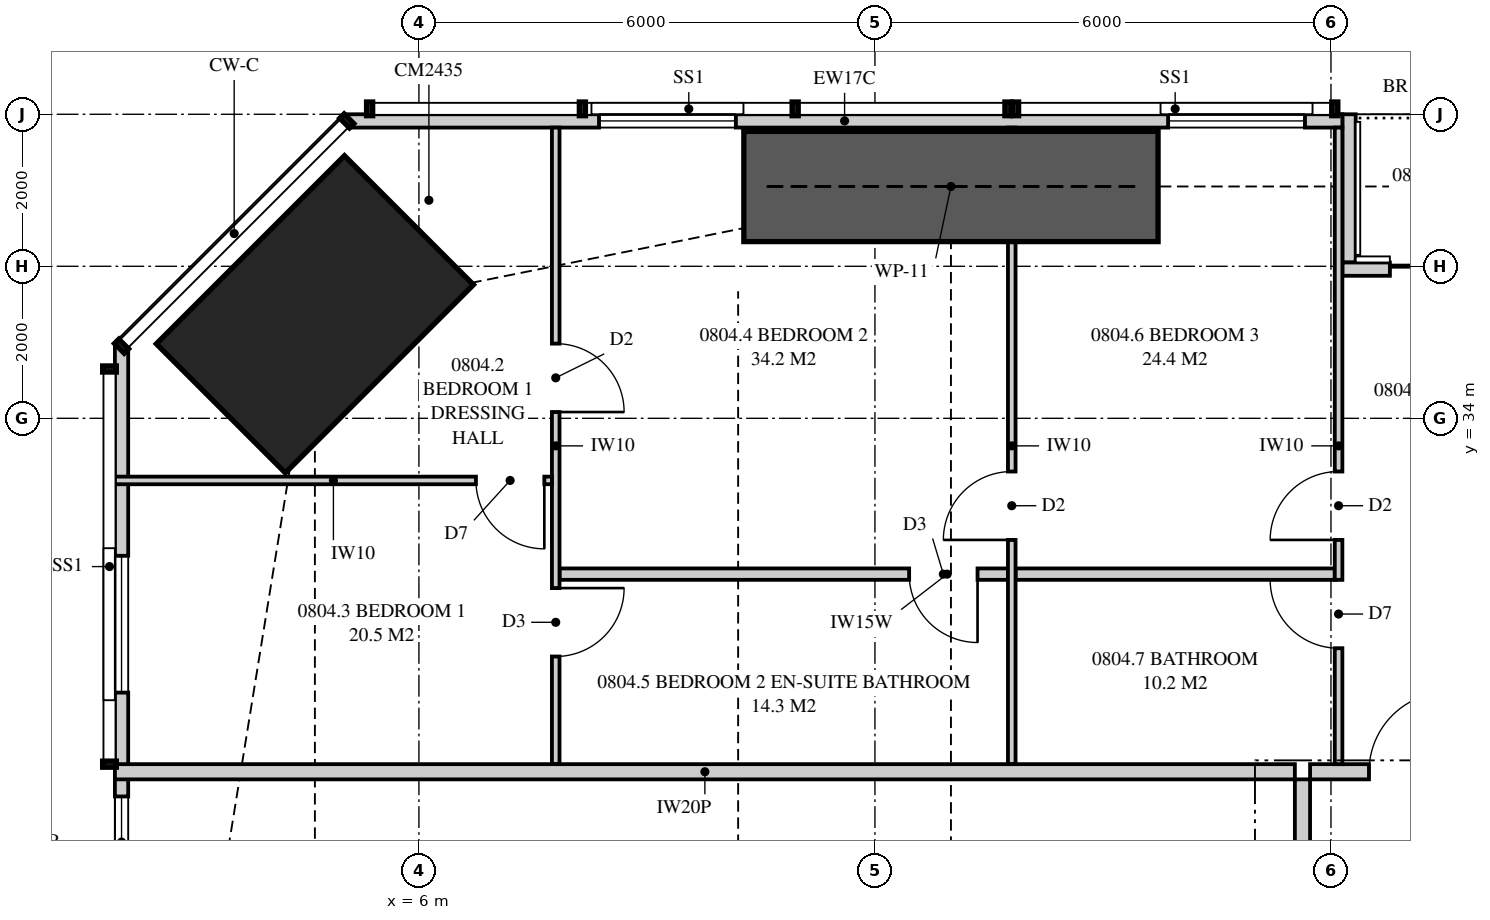
"""IFC4 building model, lengths in metres.
Left out: names, types, materials, properties, quantities, classifications, styles, units other than length and angle.
Written with IfcOpenShell. Run it as: python <this file> out.ifc"""

import sys

from ifc_helpers import new_model, si_unit, direction, frame, frame_2d, origin, origin_2d, place, context, subcontext, project, spatial, polyline, rectangle, outline, extrude, element, fill, save


model = new_model("IFC4")
c1 = context("Model", 3, precision=1e-05, world=origin(), true_north=direction((0.0, 1.0)))
c2 = subcontext(c1, "Body", "Model", "MODEL_VIEW")
j1 = project(units=[si_unit("LENGTHUNIT", "METRE"), si_unit("PLANEANGLEUNIT", "RADIAN")], contexts=[c1])
p1 = place(None, origin())
s1 = spatial("IfcSite", under=j1, at=p1, CompositionType="ELEMENT")
p2 = place(p1, origin())
s2 = spatial("IfcBuilding", under=s1, at=p2, CompositionType="ELEMENT")
p3 = place(p2, frame((0.0, 0.0, 34.4)))
s3 = spatial("IfcBuildingStorey", under=s2, at=p3, CompositionType="ELEMENT", Elevation=34.4)
p4 = place(p3, frame((4.631, 35.369, 0.0), z_axis=(0.0, 0.0, 1.0), x_axis=(0.707106781187, -0.707106781187, 0.0)))
e1 = element("IfcColumn", 1, at=p4, inside=s3, PredefinedType="COLUMN", context=c2, shape_type="SweptSolid", body=[
    extrude(rectangle(XDim=2.4, YDim=3.5, at=origin_2d()), origin(), (0.0, 0.0, 1.0), 3.35),
])
p5 = place(p3, frame((18.15, 37.913, 0.0), z_axis=(0.0, 0.0, 1.0), x_axis=(-1.0, 0.0, 0.0)))
e2 = element("IfcWall", 2, at=p5, inside=s3, PredefinedType="SOLIDWALL", context=c2, shape_type="SweptSolid", body=[
    extrude(outline(polyline([(0.0, 0.0), (13.099, 0.0), (13.099, 3.11), (5.354, 3.11), (5.354, 2.15), (5.306, 2.15), (5.306, 3.11), (5.15, 3.11), (5.15, 2.15), (0.0, 2.15), (0.0, 0.0)])), frame((0.0, 0.087, 0.0), z_axis=(0.0, -1.0, 0.0), x_axis=(1.0, 0.0, 0.0)), (0.0, 0.0, 1.0), 0.175),
])
p6 = place(p5, frame((0.492, 0.0, 0.4)))
e3 = element("IfcOpeningElement", 3, at=p6, cuts=e2, PredefinedType="OPENING", context=c2, shape_type="SweptSolid", body=[
    extrude(rectangle(XDim=1.8, YDim=1.7, at=frame_2d((0.9, 0.85))), frame((0.0, 0.097, 0.0), z_axis=(0.0, -1.0, 0.0), x_axis=(1.0, 0.0, 0.0)), (0.0, 0.0, 1.0), 0.195),
])
p7 = place(p5, frame((7.98, 0.0, 0.4)))
e4 = element("IfcOpeningElement", 4, at=p7, cuts=e2, PredefinedType="OPENING", context=c2, shape_type="SweptSolid", body=[
    extrude(rectangle(XDim=1.8, YDim=1.7, at=frame_2d((0.9, 0.85))), frame((0.0, 0.097, 0.0), z_axis=(0.0, -1.0, 0.0), x_axis=(1.0, 0.0, 0.0)), (0.0, 0.0, 1.0), 0.195),
])
p8 = place(p3, frame((21.2, 35.962, 0.0), z_axis=(0.0, 0.0, 1.0), x_axis=(-1.0, 0.0, 0.0)))
e5 = element("IfcWall", 5, at=p8, inside=s3, PredefinedType="SOLIDWALL", context=c2, shape_type="SweptSolid", body=[
    extrude(rectangle(XDim=3.05, YDim=0.175, at=frame_2d((1.525, 0.0))), origin(), (0.0, 0.0, 1.0), 3.11),
])
p9 = place(p8, frame((0.625, 0.0, 0.0)))
e6 = element("IfcOpeningElement", 6, at=p9, cuts=e5, PredefinedType="OPENING", context=c2, shape_type="SweptSolid", body=[
    extrude(rectangle(XDim=1.8, YDim=2.1, at=frame_2d((0.9, 1.05))), frame((0.0, 0.097, 0.0), z_axis=(0.0, -1.0, 0.0), x_axis=(1.0, 0.0, 0.0)), (0.0, 0.0, 1.0), 0.195),
])
p10 = place(p3, frame((18.238, 38.0, 0.0), z_axis=(0.0, 0.0, 1.0), x_axis=(0.0, -1.0, 0.0)))
e7 = element("IfcWall", 7, at=p10, inside=s3, PredefinedType="SOLIDWALL", context=c2, shape_type="SweptSolid", body=[
    extrude(outline(polyline([(0.0, 0.0), (1.95, 0.0), (1.95, 3.11), (1.75, 3.11), (1.75, 2.15), (0.15, 2.15), (0.15, 3.11), (0.0, 3.11), (0.0, 0.0)])), frame((0.0, 0.087, 0.0), z_axis=(0.0, -1.0, 0.0), x_axis=(1.0, 0.0, 0.0)), (0.0, 0.0, 1.0), 0.175),
])
p11 = place(p3, frame((2.087, 34.949, 0.0), z_axis=(0.0, 0.0, 1.0), x_axis=(0.0, -1.0, 0.0)))
e8 = element("IfcWall", 8, at=p11, inside=s3, PredefinedType="SOLIDWALL", context=c2, shape_type="SweptSolid", body=[
    extrude(outline(polyline([(0.0, 0.0), (16.099, 0.0), (16.099, 2.15), (9.949, 2.15), (9.949, 3.11), (9.823, 3.11), (9.823, 2.15), (9.73, 2.15), (9.73, 3.11), (0.0, 3.11), (0.0, 0.0)])), frame((0.0, 0.087, 0.0), z_axis=(0.0, -1.0, 0.0), x_axis=(1.0, 0.0, 0.0)), (0.0, 0.0, 1.0), 0.175),
])
p12 = place(p11, frame((2.757, 0.0, 0.4)))
e9 = element("IfcOpeningElement", 9, at=p12, cuts=e8, PredefinedType="OPENING", context=c2, shape_type="SweptSolid", body=[
    extrude(rectangle(XDim=1.8, YDim=1.7, at=frame_2d((0.9, 0.85))), frame((0.0, 0.097, 0.0), z_axis=(0.0, -1.0, 0.0), x_axis=(1.0, 0.0, 0.0)), (0.0, 0.0, 1.0), 0.195),
])
p13 = place(p11, frame((5.924, 0.0, 0.4)))
e10 = element("IfcOpeningElement", 10, at=p13, cuts=e8, PredefinedType="OPENING", context=c2, shape_type="SweptSolid", body=[
    extrude(rectangle(XDim=1.2, YDim=1.7, at=frame_2d((0.6, 0.85))), frame((0.0, 0.097, 0.0), z_axis=(0.0, -1.0, 0.0), x_axis=(1.0, 0.0, 0.0)), (0.0, 0.0, 1.0), 0.195),
])
p14 = place(p11, frame((12.799, 0.0, 0.4)))
e11 = element("IfcOpeningElement", 11, at=p14, cuts=e8, PredefinedType="OPENING", context=c2, shape_type="SweptSolid", body=[
    extrude(rectangle(XDim=1.8, YDim=1.7, at=frame_2d((0.9, 0.85))), frame((0.0, 0.097, 0.0), z_axis=(0.0, -1.0, 0.0), x_axis=(1.0, 0.0, 0.0)), (0.0, 0.0, 1.0), 0.195),
])
p15 = place(p3, frame((17.725, 29.35, 0.0), z_axis=(0.0, 0.0, 1.0), x_axis=(1.0, 0.0, 0.0)))
e12 = element("IfcWall", 12, at=p15, inside=s3, PredefinedType="PARTITIONING", context=c2, shape_type="SweptSolid", body=[
    extrude(rectangle(XDim=5.375, YDim=0.2, at=frame_2d((2.688, 0.0))), origin(), (0.0, 0.0, 1.0), 3.11),
])
p16 = place(p15, frame((0.775, 0.0, 0.0)))
e13 = element("IfcOpeningElement", 13, at=p16, cuts=e12, PredefinedType="OPENING", context=c2, shape_type="SweptSolid", body=[
    extrude(rectangle(XDim=1.05, YDim=2.2, at=frame_2d((0.525, 1.1))), frame((0.0, 0.11, 0.0), z_axis=(0.0, -1.0, 0.0), x_axis=(1.0, 0.0, 0.0)), (0.0, 0.0, 1.0), 0.22),
])
p17 = place(p3, frame((7.8, 37.825, 0.0), z_axis=(0.0, 0.0, 1.0), x_axis=(0.0, -1.0, 0.0)))
e14 = element("IfcWall", 14, at=p17, inside=s3, PredefinedType="PARTITIONING", context=c2, shape_type="SweptSolid", body=[
    extrude(outline(polyline([(0.0, 0.0), (8.375, 0.0), (8.375, 3.11), (2.697, 3.11), (2.697, 2.15), (0.943, 2.15), (0.943, 3.11), (0.0, 3.11), (0.0, 0.0)])), frame((0.0, 0.05, 0.0), z_axis=(0.0, -1.0, 0.0), x_axis=(1.0, 0.0, 0.0)), (0.0, 0.0, 1.0), 0.1),
])
p18 = place(p17, frame((2.842, 0.0, 0.0)))
e15 = element("IfcOpeningElement", 15, at=p18, cuts=e14, PredefinedType="OPENING", context=c2, shape_type="SweptSolid", body=[
    extrude(rectangle(XDim=0.9, YDim=2.1, at=frame_2d((0.45, 1.05))), frame((0.0, 0.06, 0.0), z_axis=(0.0, -1.0, 0.0), x_axis=(1.0, 0.0, 0.0)), (0.0, 0.0, 1.0), 0.12),
])
p19 = place(p17, frame((6.059, 0.0, 0.0)))
e16 = element("IfcOpeningElement", 16, at=p19, cuts=e14, PredefinedType="OPENING", context=c2, shape_type="SweptSolid", body=[
    extrude(rectangle(XDim=0.9, YDim=2.1, at=frame_2d((0.45, 1.05))), frame((0.0, 0.06, 0.0), z_axis=(0.0, -1.0, 0.0), x_axis=(1.0, 0.0, 0.0)), (0.0, 0.0, 1.0), 0.12),
])
p20 = place(p3, frame((13.8, 37.825, 0.0), z_axis=(0.0, 0.0, 1.0), x_axis=(0.0, -1.0, 0.0)))
e17 = element("IfcWall", 17, at=p20, inside=s3, PredefinedType="PARTITIONING", context=c2, shape_type="SweptSolid", body=[
    extrude(outline(polyline([(1.635, 2.15), (0.0, 2.15), (0.0, 0.0), (8.375, 0.0), (8.375, 3.11), (1.635, 3.11), (1.635, 2.15)]), holes=[polyline([(1.021, 0.126), (0.529, 0.126), (0.529, 0.919), (1.021, 0.919), (1.021, 0.126)]), polyline([(1.021, 1.231), (0.529, 1.231), (0.529, 2.024), (1.021, 2.024), (1.021, 1.231)])]), frame((0.0, 0.05, 0.0), z_axis=(0.0, -1.0, 0.0), x_axis=(1.0, 0.0, 0.0)), (0.0, 0.0, 1.0), 0.1),
])
p21 = place(p20, frame((4.525, 0.0, 0.0)))
e18 = element("IfcOpeningElement", 18, at=p21, cuts=e17, PredefinedType="OPENING", context=c2, shape_type="SweptSolid", body=[
    extrude(rectangle(XDim=0.9, YDim=2.1, at=frame_2d((0.45, 1.05))), frame((0.0, 0.06, 0.0), z_axis=(0.0, -1.0, 0.0), x_axis=(1.0, 0.0, 0.0)), (0.0, 0.0, 1.0), 0.12),
])
p22 = place(p3, frame((18.1, 37.825, 0.0), z_axis=(0.0, 0.0, 1.0), x_axis=(0.0, -1.0, 0.0)))
e19 = element("IfcWall", 19, at=p22, inside=s3, PredefinedType="PARTITIONING", context=c2, shape_type="SweptSolid", body=[
    extrude(outline(polyline([(0.0, 0.0), (8.375, 0.0), (8.375, 3.11), (1.635, 3.11), (1.635, 2.15), (0.0, 2.15), (0.0, 3.11), (0.0, 0.0)])), frame((0.0, 0.05, 0.0), z_axis=(0.0, -1.0, 0.0), x_axis=(1.0, 0.0, 0.0)), (0.0, 0.0, 1.0), 0.1),
])
p23 = place(p22, frame((4.525, 0.0, 0.0)))
e20 = element("IfcOpeningElement", 20, at=p23, cuts=e19, PredefinedType="OPENING", context=c2, shape_type="SweptSolid", body=[
    extrude(rectangle(XDim=0.9, YDim=2.1, at=frame_2d((0.45, 1.05))), frame((0.0, 0.06, 0.0), z_axis=(0.0, -1.0, 0.0), x_axis=(1.0, 0.0, 0.0)), (0.0, 0.0, 1.0), 0.12),
])
p24 = place(p22, frame((5.95, 0.0, 0.0)))
e21 = element("IfcOpeningElement", 21, at=p24, cuts=e19, PredefinedType="OPENING", context=c2, shape_type="SweptSolid", body=[
    extrude(rectangle(XDim=0.9, YDim=2.1, at=frame_2d((0.45, 1.05))), frame((0.0, 0.06, 0.0), z_axis=(0.0, -1.0, 0.0), x_axis=(1.0, 0.0, 0.0)), (0.0, 0.0, 1.0), 0.12),
])
p25 = place(p3, frame((2.0, 33.183, 0.0), z_axis=(0.0, 0.0, 1.0), x_axis=(1.0, 0.0, 0.0)))
e22 = element("IfcWall", 22, at=p25, inside=s3, PredefinedType="PARTITIONING", context=c2, shape_type="SweptSolid", body=[
    extrude(outline(polyline([(0.0, 0.0), (5.75, 0.0), (5.75, 3.11), (3.148, 3.11), (3.148, 2.15), (1.406, 2.15), (1.406, 3.11), (0.0, 3.11), (0.0, 0.0)])), frame((0.0, 0.05, 0.0), z_axis=(0.0, -1.0, 0.0), x_axis=(1.0, 0.0, 0.0)), (0.0, 0.0, 1.0), 0.1),
])
p26 = place(p25, frame((4.75, 0.0, 0.0)))
e23 = element("IfcOpeningElement", 23, at=p26, cuts=e22, PredefinedType="OPENING", context=c2, shape_type="SweptSolid", body=[
    extrude(rectangle(XDim=0.9, YDim=2.1, at=frame_2d((0.45, 1.05))), frame((0.0, 0.06, 0.0), z_axis=(0.0, -1.0, 0.0), x_axis=(1.0, 0.0, 0.0)), (0.0, 0.0, 1.0), 0.12),
])
p27 = place(p3, frame((7.85, 31.95, 0.0), z_axis=(0.0, 0.0, 1.0), x_axis=(1.0, 0.0, 0.0)))
e24 = element("IfcWall", 24, at=p27, inside=s3, PredefinedType="PLUMBINGWALL", context=c2, shape_type="SweptSolid", body=[
    extrude(outline(polyline([(0.0, 0.0), (5.9, 0.0), (5.9, 3.11), (5.462, 3.11), (5.462, 2.541), (4.838, 2.541), (4.838, 3.11), (3.635, 3.11), (3.635, 2.51), (1.065, 2.51), (1.065, 3.11), (0.0, 3.11), (0.0, 0.0)])), frame((0.0, 0.075, 0.0), z_axis=(0.0, -1.0, 0.0), x_axis=(1.0, 0.0, 0.0)), (0.0, 0.0, 1.0), 0.15),
])
p28 = place(p27, frame((4.6, 0.0, 0.0)))
e25 = element("IfcOpeningElement", 25, at=p28, cuts=e24, PredefinedType="OPENING", context=c2, shape_type="SweptSolid", body=[
    extrude(rectangle(XDim=0.9, YDim=2.1, at=frame_2d((0.45, 1.05))), frame((0.0, 0.085, 0.0), z_axis=(0.0, -1.0, 0.0), x_axis=(1.0, 0.0, 0.0)), (0.0, 0.0, 1.0), 0.17),
])
p29 = place(p3, frame((13.85, 31.95, 0.0), z_axis=(0.0, 0.0, 1.0), x_axis=(1.0, 0.0, 0.0)))
e26 = element("IfcWall", 26, at=p29, inside=s3, PredefinedType="PLUMBINGWALL", context=c2, shape_type="SweptSolid", body=[
    extrude(rectangle(XDim=4.2, YDim=0.15, at=frame_2d((2.1, 0.0))), origin(), (0.0, 0.0, 1.0), 3.11),
])
p30 = place(p3, frame((2.0, 29.35, 0.0), z_axis=(0.0, 0.0, 1.0), x_axis=(1.0, 0.0, 0.0)))
e27 = element("IfcWall", 27, at=p30, inside=s3, PredefinedType="PARTITIONING", context=c2, shape_type="SweptSolid", body=[
    extrude(outline(polyline([(0.0, 0.0), (15.525, 0.0), (15.525, 3.11), (11.337, 3.11), (11.337, 2.541), (10.663, 2.541), (10.663, 3.11), (9.51, 3.11), (9.51, 2.51), (6.89, 2.51), (6.89, 3.11), (2.969, 3.11), (2.969, 2.541), (2.577, 2.541), (2.577, 2.15), (0.733, 2.15), (0.733, 3.11), (0.0, 3.11), (0.0, 0.0)])), frame((0.0, 0.1, 0.0), z_axis=(0.0, -1.0, 0.0), x_axis=(1.0, 0.0, 0.0)), (0.0, 0.0, 1.0), 0.2),
])
p31 = place(p3, frame((17.625, 24.1, 0.0), z_axis=(0.0, 0.0, 1.0), x_axis=(0.0, 1.0, 0.0)))
e28 = element("IfcWall", 28, at=p31, inside=s3, PredefinedType="PARTITIONING", context=c2, shape_type="SweptSolid", body=[
    extrude(outline(polyline([(0.0, 0.0), (5.15, 0.0), (5.15, 3.11), (1.237, 3.11), (1.237, 2.541), (0.562, 2.541), (0.562, 3.11), (0.0, 3.11), (0.0, 0.0)])), frame((0.0, 0.1, 0.0), z_axis=(0.0, -1.0, 0.0), x_axis=(1.0, 0.0, 0.0)), (0.0, 0.0, 1.0), 0.2),
])
p32 = place(p31, frame((1.675, 0.0, 0.0)))
e29 = element("IfcOpeningElement", 29, at=p32, cuts=e28, PredefinedType="OPENING", context=c2, shape_type="SweptSolid", body=[
    extrude(rectangle(XDim=1.8, YDim=2.1, at=frame_2d((0.9, 1.05))), frame((0.0, 0.11, 0.0), z_axis=(0.0, -1.0, 0.0), x_axis=(1.0, 0.0, 0.0)), (0.0, 0.0, 1.0), 0.22),
])
p33 = place(p3, frame((10.275, 37.05, 0.0), z_axis=(0.0, 0.0, 1.0), x_axis=(1.0, 0.0, 0.0)))
e30 = element("IfcWall", 30, at=p33, inside=s3, PredefinedType="SHEAR", context=c2, shape_type="SweptSolid", body=[
    extrude(rectangle(XDim=5.45, YDim=1.45, at=frame_2d((2.725, 0.0))), origin(), (0.0, 0.0, 1.0), 3.35),
])
p34 = place(p9, origin())
e31 = element("IfcDoor", 31, at=p34, inside=s3, OperationType="SLIDING_TO_LEFT", PredefinedType="DOOR", context=c2, shape_type="SweptSolid", body=[
    extrude(rectangle(XDim=1.8, YDim=2.1, at=frame_2d((0.9, 1.05))), frame((0.0, 0.025, 0.0), z_axis=(0.0, -1.0, 0.0), x_axis=(1.0, 0.0, 0.0)), (0.0, 0.0, 1.0), 0.05),
])
fill(e6, e31)
p35 = place(p6, origin())
e32 = element("IfcWindow", 32, at=p35, inside=s3, PartitioningType="SINGLE_PANEL", PredefinedType="WINDOW", context=c2, shape_type="SweptSolid", body=[
    extrude(rectangle(XDim=1.8, YDim=1.7, at=frame_2d((0.9, 0.85))), frame((0.0, 0.03, 0.0), z_axis=(0.0, -1.0, 0.0), x_axis=(1.0, 0.0, 0.0)), (0.0, 0.0, 1.0), 0.06),
])
fill(e3, e32)
p36 = place(p7, origin())
e33 = element("IfcWindow", 33, at=p36, inside=s3, PartitioningType="SINGLE_PANEL", PredefinedType="WINDOW", context=c2, shape_type="SweptSolid", body=[
    extrude(rectangle(XDim=1.8, YDim=1.7, at=frame_2d((0.9, 0.85))), frame((0.0, 0.03, 0.0), z_axis=(0.0, -1.0, 0.0), x_axis=(1.0, 0.0, 0.0)), (0.0, 0.0, 1.0), 0.06),
])
fill(e4, e33)
p37 = place(p12, origin())
e34 = element("IfcWindow", 34, at=p37, inside=s3, PartitioningType="SINGLE_PANEL", PredefinedType="WINDOW", context=c2, shape_type="SweptSolid", body=[
    extrude(rectangle(XDim=1.8, YDim=1.7, at=frame_2d((0.9, 0.85))), frame((0.0, 0.03, 0.0), z_axis=(0.0, -1.0, 0.0), x_axis=(1.0, 0.0, 0.0)), (0.0, 0.0, 1.0), 0.06),
])
fill(e9, e34)
p38 = place(p13, origin())
e35 = element("IfcWindow", 35, at=p38, inside=s3, PartitioningType="SINGLE_PANEL", PredefinedType="WINDOW", context=c2, shape_type="SweptSolid", body=[
    extrude(rectangle(XDim=1.2, YDim=1.7, at=frame_2d((0.6, 0.85))), frame((0.0, 0.03, 0.0), z_axis=(0.0, -1.0, 0.0), x_axis=(1.0, 0.0, 0.0)), (0.0, 0.0, 1.0), 0.06),
])
fill(e10, e35)
p39 = place(p16, origin())
e36 = element("IfcDoor", 36, at=p39, inside=s3, OperationType="SINGLE_SWING_RIGHT", PredefinedType="DOOR", context=c2, shape_type="SweptSolid", body=[
    extrude(rectangle(XDim=1.05, YDim=2.2, at=frame_2d((0.525, 1.1))), frame((0.0, 0.025, 0.0), z_axis=(0.0, -1.0, 0.0), x_axis=(1.0, 0.0, 0.0)), (0.0, 0.0, 1.0), 0.05),
])
fill(e13, e36)
p40 = place(p26, frame((0.9, 0.0, 0.0), z_axis=(0.0, 0.0, 1.0), x_axis=(-1.0, 0.0, 0.0)))
e37 = element("IfcDoor", 37, at=p40, inside=s3, OperationType="SINGLE_SWING_LEFT", PredefinedType="DOOR", context=c2, shape_type="SweptSolid", body=[
    extrude(rectangle(XDim=0.9, YDim=2.1, at=frame_2d((0.45, 1.05))), frame((0.0, 0.025, 0.0), z_axis=(0.0, -1.0, 0.0), x_axis=(1.0, 0.0, 0.0)), (0.0, 0.0, 1.0), 0.05),
])
fill(e23, e37)
p41 = place(p18, origin())
e38 = element("IfcDoor", 38, at=p41, inside=s3, OperationType="SINGLE_SWING_RIGHT", PredefinedType="DOOR", context=c2, shape_type="SweptSolid", body=[
    extrude(rectangle(XDim=0.9, YDim=2.1, at=frame_2d((0.45, 1.05))), frame((0.0, 0.025, 0.0), z_axis=(0.0, -1.0, 0.0), x_axis=(1.0, 0.0, 0.0)), (0.0, 0.0, 1.0), 0.05),
])
fill(e15, e38)
p42 = place(p21, frame((0.9, 0.0, 0.0), z_axis=(0.0, 0.0, 1.0), x_axis=(-1.0, 0.0, 0.0)))
e39 = element("IfcDoor", 39, at=p42, inside=s3, OperationType="SINGLE_SWING_LEFT", PredefinedType="DOOR", context=c2, shape_type="SweptSolid", body=[
    extrude(rectangle(XDim=0.9, YDim=2.1, at=frame_2d((0.45, 1.05))), frame((0.0, 0.025, 0.0), z_axis=(0.0, -1.0, 0.0), x_axis=(1.0, 0.0, 0.0)), (0.0, 0.0, 1.0), 0.05),
])
fill(e18, e39)
p43 = place(p28, frame((0.9, 0.0, 0.0), z_axis=(0.0, 0.0, 1.0), x_axis=(-1.0, 0.0, 0.0)))
e40 = element("IfcDoor", 40, at=p43, inside=s3, OperationType="SINGLE_SWING_LEFT", PredefinedType="DOOR", context=c2, shape_type="SweptSolid", body=[
    extrude(rectangle(XDim=0.9, YDim=2.1, at=frame_2d((0.45, 1.05))), frame((0.0, 0.025, 0.0), z_axis=(0.0, -1.0, 0.0), x_axis=(1.0, 0.0, 0.0)), (0.0, 0.0, 1.0), 0.05),
])
fill(e25, e40)
p44 = place(p23, frame((0.9, 0.0, 0.0), z_axis=(0.0, 0.0, 1.0), x_axis=(-1.0, 0.0, 0.0)))
e41 = element("IfcDoor", 41, at=p44, inside=s3, OperationType="SINGLE_SWING_LEFT", PredefinedType="DOOR", context=c2, shape_type="SweptSolid", body=[
    extrude(rectangle(XDim=0.9, YDim=2.1, at=frame_2d((0.45, 1.05))), frame((0.0, 0.025, 0.0), z_axis=(0.0, -1.0, 0.0), x_axis=(1.0, 0.0, 0.0)), (0.0, 0.0, 1.0), 0.05),
])
fill(e20, e41)
p45 = place(p24, frame((0.9, 0.0, 0.0), z_axis=(0.0, 0.0, 1.0), x_axis=(-1.0, 0.0, 0.0)))
e42 = element("IfcDoor", 42, at=p45, inside=s3, OperationType="SINGLE_SWING_RIGHT", PredefinedType="DOOR", context=c2, shape_type="SweptSolid", body=[
    extrude(rectangle(XDim=0.9, YDim=2.1, at=frame_2d((0.45, 1.05))), frame((0.0, 0.025, 0.0), z_axis=(0.0, -1.0, 0.0), x_axis=(1.0, 0.0, 0.0)), (0.0, 0.0, 1.0), 0.05),
])
fill(e21, e42)
p46 = place(p19, origin())
e43 = element("IfcDoor", 43, at=p46, inside=s3, OperationType="SINGLE_SWING_LEFT", PredefinedType="DOOR", context=c2, shape_type="SweptSolid", body=[
    extrude(rectangle(XDim=0.9, YDim=2.1, at=frame_2d((0.45, 1.05))), frame((0.0, 0.025, 0.0), z_axis=(0.0, -1.0, 0.0), x_axis=(1.0, 0.0, 0.0)), (0.0, 0.0, 1.0), 0.05),
])
fill(e16, e43)
save(model, sys.argv[1])
